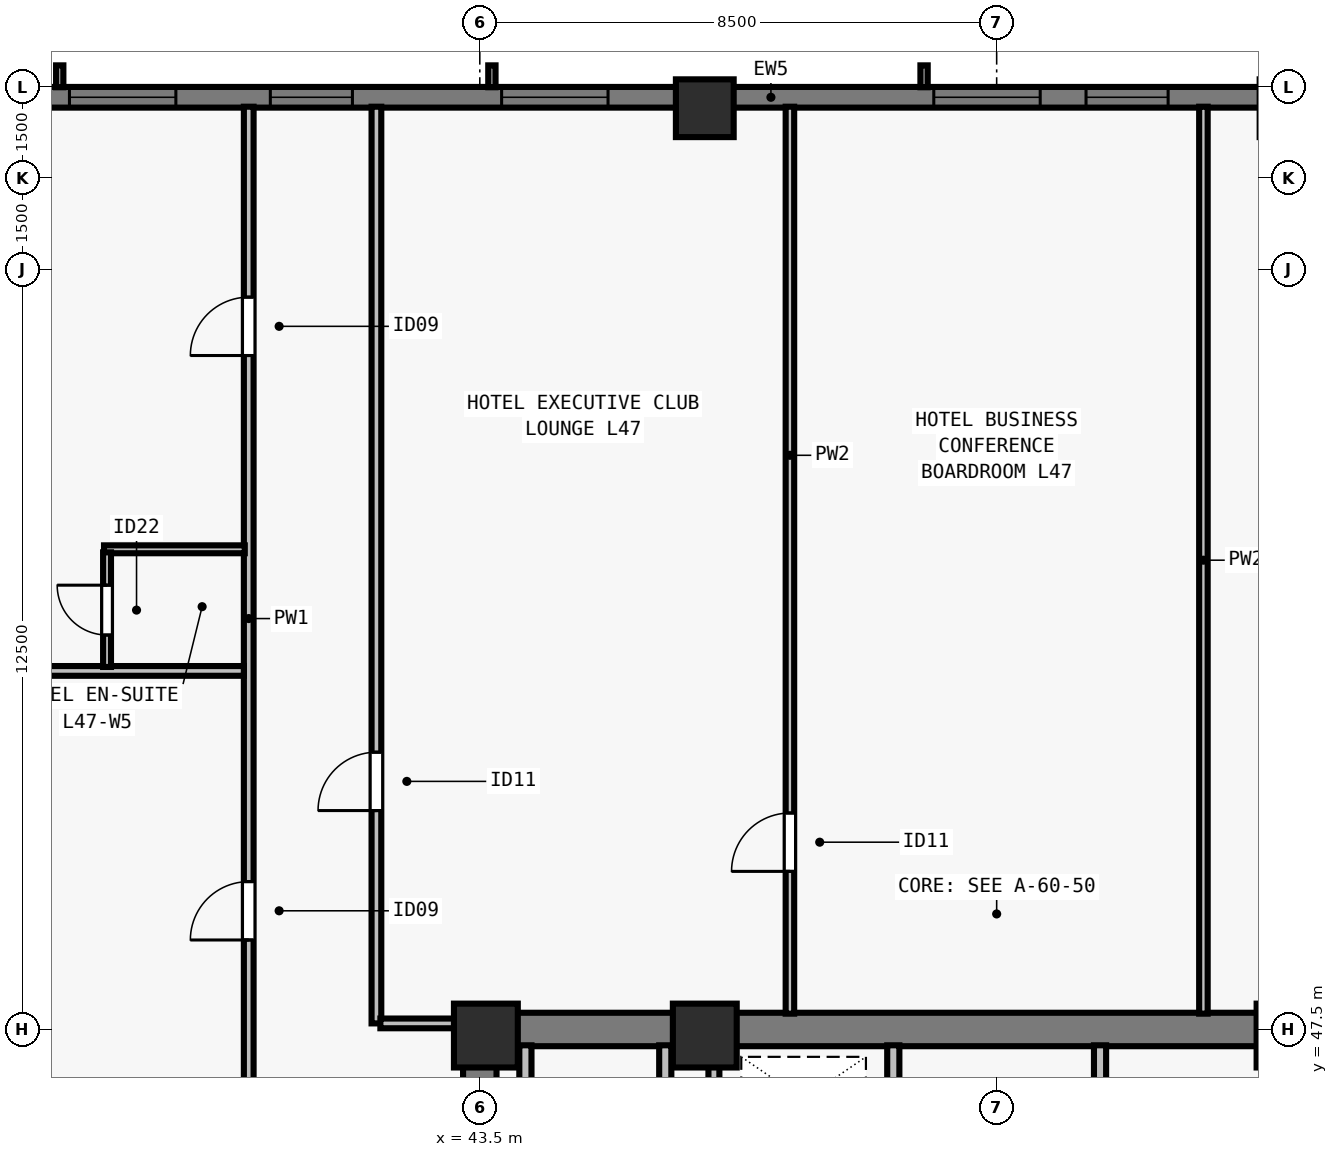
"""IFC4 building model, lengths in metres.
Left out: names, types, materials, properties, quantities, classifications, styles, units other than length and angle.
Written with IfcOpenShell. Run it as: python <this file> out.ifc"""

import sys

from ifc_helpers import new_model, si_unit, direction, frame, frame_2d, origin, origin_2d, place, context, subcontext, project, spatial, rectangle, extrude, element, fill, save


model = new_model("IFC4")
c1 = context("Model", 3, precision=1e-05, world=origin(), true_north=direction((0.0, 1.0)))
c2 = subcontext(c1, "Body", "Model", "MODEL_VIEW")
j1 = project(units=[si_unit("LENGTHUNIT", "METRE"), si_unit("PLANEANGLEUNIT", "RADIAN")], contexts=[c1])
p1 = place(None, origin())
s1 = spatial("IfcSite", under=j1, at=p1, CompositionType="ELEMENT")
p2 = place(p1, origin())
s2 = spatial("IfcBuilding", under=s1, at=p2, CompositionType="ELEMENT")
p3 = place(p2, frame((0.0, 0.0, 172.5)))
s3 = spatial("IfcBuildingStorey", under=s2, at=p3, CompositionType="ELEMENT", Elevation=172.5)
for number, where, z_axis, x_axis in (
    (1, (43.6, 47.4, 0.0), (0.0, 0.0, 1.0), (1.0, 0.0, 0.0)),
    (2, (47.2, 47.4, 0.0), (0.0, 0.0, 1.0), (1.0, 0.0, 0.0)),
    (3, (56.8, 47.4, 0.0), (0.0, 0.0, 1.0), (1.0, 0.0, 0.0)),
):
    element("IfcColumn", number, at=place(p3, frame(where, z_axis=z_axis, x_axis=x_axis)), inside=s3, PredefinedType="COLUMN", context=c2, shape_type="SweptSolid", body=[
        extrude(rectangle(XDim=1.05, YDim=1.05, at=origin_2d()), origin(), (0.0, 0.0, 1.0), 3.5),
    ])
p4 = place(p3, frame((47.2, 62.65, 0.0), z_axis=(0.0, 0.0, 1.0), x_axis=(1.0, 0.0, 0.0)))
e4 = element("IfcColumn", 4, at=p4, inside=s3, PredefinedType="COLUMN", context=c2, shape_type="SweptSolid", body=[
    extrude(rectangle(XDim=0.95, YDim=0.95, at=origin_2d()), origin(), (0.0, 0.0, 1.0), 3.5),
])
p5 = place(p3, frame((32.0, 62.83, 0.0), z_axis=(0.0, 0.0, 1.0), x_axis=(1.0, 0.0, 0.0)))
e5 = element("IfcWall", 5, at=p5, inside=s3, PredefinedType="SOLIDWALL", context=c2, shape_type="SweptSolid", body=[
    extrude(rectangle(XDim=39.682, YDim=0.34, at=frame_2d((19.841, 0.0))), origin(), (0.0, 0.0, 1.0), 3.28),
])
p6 = place(p5, frame((4.752, 0.0, 0.8)))
e6 = element("IfcOpeningElement", 6, at=p6, cuts=e5, PredefinedType="OPENING", context=c2, shape_type="SweptSolid", body=[
    extrude(rectangle(XDim=1.75, YDim=1.66, at=frame_2d((0.875, 0.83))), frame((0.0, 0.18, 0.0), z_axis=(0.0, -1.0, 0.0), x_axis=(1.0, 0.0, 0.0)), (0.0, 0.0, 1.0), 0.36),
])
p7 = place(p5, frame((8.055, 0.0, 0.8)))
e7 = element("IfcOpeningElement", 7, at=p7, cuts=e5, PredefinedType="OPENING", context=c2, shape_type="SweptSolid", body=[
    extrude(rectangle(XDim=1.35, YDim=1.66, at=frame_2d((0.675, 0.83))), frame((0.0, 0.18, 0.0), z_axis=(0.0, -1.0, 0.0), x_axis=(1.0, 0.0, 0.0)), (0.0, 0.0, 1.0), 0.36),
])
p8 = place(p5, frame((11.859, 0.0, 0.8)))
e8 = element("IfcOpeningElement", 8, at=p8, cuts=e5, PredefinedType="OPENING", context=c2, shape_type="SweptSolid", body=[
    extrude(rectangle(XDim=1.75, YDim=1.66, at=frame_2d((0.875, 0.83))), frame((0.0, 0.18, 0.0), z_axis=(0.0, -1.0, 0.0), x_axis=(1.0, 0.0, 0.0)), (0.0, 0.0, 1.0), 0.36),
])
p9 = place(p5, frame((18.966, 0.0, 0.8)))
e9 = element("IfcOpeningElement", 9, at=p9, cuts=e5, PredefinedType="OPENING", context=c2, shape_type="SweptSolid", body=[
    extrude(rectangle(XDim=1.75, YDim=1.66, at=frame_2d((0.875, 0.83))), frame((0.0, 0.18, 0.0), z_axis=(0.0, -1.0, 0.0), x_axis=(1.0, 0.0, 0.0)), (0.0, 0.0, 1.0), 0.36),
])
p10 = place(p5, frame((21.469, 0.0, 0.8)))
e10 = element("IfcOpeningElement", 10, at=p10, cuts=e5, PredefinedType="OPENING", context=c2, shape_type="SweptSolid", body=[
    extrude(rectangle(XDim=1.35, YDim=1.66, at=frame_2d((0.675, 0.83))), frame((0.0, 0.18, 0.0), z_axis=(0.0, -1.0, 0.0), x_axis=(1.0, 0.0, 0.0)), (0.0, 0.0, 1.0), 0.36),
])
p11 = place(p5, frame((26.073, 0.0, 0.8)))
e11 = element("IfcOpeningElement", 11, at=p11, cuts=e5, PredefinedType="OPENING", context=c2, shape_type="SweptSolid", body=[
    extrude(rectangle(XDim=1.75, YDim=1.66, at=frame_2d((0.875, 0.83))), frame((0.0, 0.18, 0.0), z_axis=(0.0, -1.0, 0.0), x_axis=(1.0, 0.0, 0.0)), (0.0, 0.0, 1.0), 0.36),
])
p12 = place(p5, frame((29.827, 0.0, 0.8)))
e12 = element("IfcOpeningElement", 12, at=p12, cuts=e5, PredefinedType="OPENING", context=c2, shape_type="SweptSolid", body=[
    extrude(rectangle(XDim=1.35, YDim=1.66, at=frame_2d((0.675, 0.83))), frame((0.0, 0.18, 0.0), z_axis=(0.0, -1.0, 0.0), x_axis=(1.0, 0.0, 0.0)), (0.0, 0.0, 1.0), 0.36),
])
p13 = place(p5, frame((34.47, 0.0, 0.8)))
e13 = element("IfcOpeningElement", 13, at=p13, cuts=e5, PredefinedType="OPENING", context=c2, shape_type="SweptSolid", body=[
    extrude(rectangle(XDim=0.9, YDim=1.66, at=frame_2d((0.45, 0.83))), frame((0.0, 0.18, 0.0), z_axis=(0.0, -1.0, 0.0), x_axis=(1.0, 0.0, 0.0)), (0.0, 0.0, 1.0), 0.36),
])
p14 = place(p3, frame((43.225, 47.5, 0.0), z_axis=(0.0, 0.0, 1.0), x_axis=(1.0, 0.0, 0.0)))
e14 = element("IfcWall", 14, at=p14, inside=s3, PredefinedType="SHEAR", context=c2, shape_type="SweptSolid", body=[
    extrude(rectangle(XDim=17.55, YDim=0.55, at=frame_2d((8.775, 0.0))), origin(), (0.0, 0.0, 1.0), 3.28),
])
p15 = place(p3, frame((43.5, 40.8, 0.0), z_axis=(0.0, 0.0, 1.0), x_axis=(0.0, 1.0, 0.0)))
e15 = element("IfcWall", 15, at=p15, inside=s3, PredefinedType="SHEAR", context=c2, shape_type="SweptSolid", body=[
    extrude(rectangle(XDim=6.435, YDim=0.55, at=frame_2d((3.218, 0.0))), origin(), (0.0, 0.0, 1.0), 3.28),
])
p16 = place(p3, frame((50.3, 40.585, 0.0), z_axis=(0.0, 0.0, 1.0), x_axis=(0.0, 1.0, 0.0)))
e16 = element("IfcWall", 16, at=p16, inside=s3, PredefinedType="SOLIDWALL", context=c2, shape_type="SweptSolid", body=[
    extrude(rectangle(XDim=6.655, YDim=0.2, at=frame_2d((3.328, 0.0))), origin(), (0.0, 0.0, 1.0), 3.28),
])
p17 = place(p16, frame((5.065, 0.0, 0.0)))
e17 = element("IfcOpeningElement", 17, at=p17, cuts=e16, PredefinedType="OPENING", context=c2, shape_type="SweptSolid", body=[
    extrude(rectangle(XDim=0.8, YDim=2.08, at=frame_2d((0.4, 1.04))), frame((0.0, 0.11, 0.0), z_axis=(0.0, -1.0, 0.0), x_axis=(1.0, 0.0, 0.0)), (0.0, 0.0, 1.0), 0.22),
])
p18 = place(p3, frame((53.7, 40.585, 0.0), z_axis=(0.0, 0.0, 1.0), x_axis=(0.0, 1.0, 0.0)))
e18 = element("IfcWall", 18, at=p18, inside=s3, PredefinedType="SOLIDWALL", context=c2, shape_type="SweptSolid", body=[
    extrude(rectangle(XDim=6.655, YDim=0.2, at=frame_2d((3.328, 0.0))), origin(), (0.0, 0.0, 1.0), 3.28),
])
p19 = place(p18, frame((0.195, 0.0, 0.0)))
e19 = element("IfcOpeningElement", 19, at=p19, cuts=e18, PredefinedType="OPENING", context=c2, shape_type="SweptSolid", body=[
    extrude(rectangle(XDim=0.8, YDim=2.08, at=frame_2d((0.4, 1.04))), frame((0.0, 0.11, 0.0), z_axis=(0.0, -1.0, 0.0), x_axis=(1.0, 0.0, 0.0)), (0.0, 0.0, 1.0), 0.22),
])
p20 = place(p18, frame((4.265, 0.0, 0.0)))
e20 = element("IfcOpeningElement", 20, at=p20, cuts=e18, PredefinedType="OPENING", context=c2, shape_type="SweptSolid", body=[
    extrude(rectangle(XDim=0.95, YDim=2.12, at=frame_2d((0.475, 1.06))), frame((0.0, 0.11, 0.0), z_axis=(0.0, -1.0, 0.0), x_axis=(1.0, 0.0, 0.0)), (0.0, 0.0, 1.0), 0.22),
])
for number, where, z_axis, x_axis in (
    (21, (46.55, 43.735, 0.0), (0.0, 0.0, 1.0), (0.0, 1.0, 0.0)),
    (22, (44.25, 43.735, 0.0), (0.0, 0.0, 1.0), (0.0, 1.0, 0.0)),
):
    element("IfcWall", number, at=place(p3, frame(where, z_axis=z_axis, x_axis=x_axis)), inside=s3, PredefinedType="SOLIDWALL", context=c2, shape_type="SweptSolid", body=[
        extrude(rectangle(XDim=3.505, YDim=0.2, at=frame_2d((1.752, 0.0))), origin(), (0.0, 0.0, 1.0), 3.28),
    ])
p21 = place(p3, frame((47.35, 43.735, 0.0), z_axis=(0.0, 0.0, 1.0), x_axis=(0.0, 1.0, 0.0)))
e23 = element("IfcWall", 23, at=p21, inside=s3, PredefinedType="SOLIDWALL", context=c2, shape_type="SweptSolid", body=[
    extrude(rectangle(XDim=3.505, YDim=0.18, at=frame_2d((1.752, 0.0))), origin(), (0.0, 0.0, 1.0), 3.28),
])
p22 = place(p3, frame((39.7, 15.325, 0.0), z_axis=(0.0, 0.0, 1.0), x_axis=(0.0, 1.0, 0.0)))
e24 = element("IfcWall", 24, at=p22, inside=s3, PredefinedType="PARTITIONING", context=c2, shape_type="SweptSolid", body=[
    extrude(rectangle(XDim=47.35, YDim=0.16, at=frame_2d((23.675, 0.0))), origin(), (0.0, 0.0, 1.0), 2.555),
])
p23 = place(p22, frame((5.451, 0.0, 0.0)))
e25 = element("IfcOpeningElement", 25, at=p23, cuts=e24, PredefinedType="OPENING", context=c2, shape_type="SweptSolid", body=[
    extrude(rectangle(XDim=0.96, YDim=2.15, at=frame_2d((0.48, 1.075))), frame((0.0, 0.09, 0.0), z_axis=(0.0, -1.0, 0.0), x_axis=(1.0, 0.0, 0.0)), (0.0, 0.0, 1.0), 0.18),
])
p24 = place(p22, frame((14.783, 0.0, 0.0)))
e26 = element("IfcOpeningElement", 26, at=p24, cuts=e24, PredefinedType="OPENING", context=c2, shape_type="SweptSolid", body=[
    extrude(rectangle(XDim=0.96, YDim=2.15, at=frame_2d((0.48, 1.075))), frame((0.0, 0.09, 0.0), z_axis=(0.0, -1.0, 0.0), x_axis=(1.0, 0.0, 0.0)), (0.0, 0.0, 1.0), 0.18),
])
p25 = place(p22, frame((24.215, 0.0, 0.0)))
e27 = element("IfcOpeningElement", 27, at=p25, cuts=e24, PredefinedType="OPENING", context=c2, shape_type="SweptSolid", body=[
    extrude(rectangle(XDim=0.96, YDim=2.15, at=frame_2d((0.48, 1.075))), frame((0.0, 0.09, 0.0), z_axis=(0.0, -1.0, 0.0), x_axis=(1.0, 0.0, 0.0)), (0.0, 0.0, 1.0), 0.18),
])
p26 = place(p22, frame((33.647, 0.0, 0.0)))
e28 = element("IfcOpeningElement", 28, at=p26, cuts=e24, PredefinedType="OPENING", context=c2, shape_type="SweptSolid", body=[
    extrude(rectangle(XDim=0.96, YDim=2.15, at=frame_2d((0.48, 1.075))), frame((0.0, 0.09, 0.0), z_axis=(0.0, -1.0, 0.0), x_axis=(1.0, 0.0, 0.0)), (0.0, 0.0, 1.0), 0.18),
])
p27 = place(p22, frame((43.258, 0.0, 0.0)))
e29 = element("IfcOpeningElement", 29, at=p27, cuts=e24, PredefinedType="OPENING", context=c2, shape_type="SweptSolid", body=[
    extrude(rectangle(XDim=0.96, YDim=2.15, at=frame_2d((0.48, 1.075))), frame((0.0, 0.09, 0.0), z_axis=(0.0, -1.0, 0.0), x_axis=(1.0, 0.0, 0.0)), (0.0, 0.0, 1.0), 0.18),
])
p28 = place(p3, frame((41.8, 47.6, 0.0), z_axis=(0.0, 0.0, 1.0), x_axis=(0.0, 1.0, 0.0)))
e30 = element("IfcWall", 30, at=p28, inside=s3, PredefinedType="PARTITIONING", context=c2, shape_type="SweptSolid", body=[
    extrude(rectangle(XDim=15.075, YDim=0.16, at=frame_2d((7.538, 0.0))), origin(), (0.0, 0.0, 1.0), 2.555),
])
p29 = place(p28, frame((3.5, 0.0, 0.0)))
e31 = element("IfcOpeningElement", 31, at=p29, cuts=e30, PredefinedType="OPENING", context=c2, shape_type="SweptSolid", body=[
    extrude(rectangle(XDim=0.96, YDim=2.12, at=frame_2d((0.48, 1.06))), frame((0.0, 0.09, 0.0), z_axis=(0.0, -1.0, 0.0), x_axis=(1.0, 0.0, 0.0)), (0.0, 0.0, 1.0), 0.18),
])
p30 = place(p3, frame((41.865, 47.6, 0.0), z_axis=(0.0, 0.0, 1.0), x_axis=(1.0, 0.0, 0.0)))
e32 = element("IfcWall", 32, at=p30, inside=s3, PredefinedType="PARTITIONING", context=c2, shape_type="SweptSolid", body=[
    extrude(rectangle(XDim=1.37, YDim=0.16, at=frame_2d((0.685, 0.0))), origin(), (0.0, 0.0, 1.0), 3.28),
])
p31 = place(p3, frame((48.6, 47.76, 0.0), z_axis=(0.0, 0.0, 1.0), x_axis=(0.0, 1.0, 0.0)))
e33 = element("IfcWall", 33, at=p31, inside=s3, PredefinedType="PARTITIONING", context=c2, shape_type="SweptSolid", body=[
    extrude(rectangle(XDim=14.915, YDim=0.14, at=frame_2d((7.458, 0.0))), origin(), (0.0, 0.0, 1.0), 2.896),
])
p32 = place(p31, frame((2.34, 0.0, 0.0)))
e34 = element("IfcOpeningElement", 34, at=p32, cuts=e33, PredefinedType="OPENING", context=c2, shape_type="SweptSolid", body=[
    extrude(rectangle(XDim=0.96, YDim=2.12, at=frame_2d((0.48, 1.06))), frame((0.0, 0.08, 0.0), z_axis=(0.0, -1.0, 0.0), x_axis=(1.0, 0.0, 0.0)), (0.0, 0.0, 1.0), 0.16),
])
p33 = place(p3, frame((55.4, 47.76, 0.0), z_axis=(0.0, 0.0, 1.0), x_axis=(0.0, 1.0, 0.0)))
e35 = element("IfcWall", 35, at=p33, inside=s3, PredefinedType="PARTITIONING", context=c2, shape_type="SweptSolid", body=[
    extrude(rectangle(XDim=14.915, YDim=0.14, at=frame_2d((7.458, 0.0))), origin(), (0.0, 0.0, 1.0), 2.896),
])
p34 = place(p3, frame((28.325, 53.396, 0.0), z_axis=(0.0, 0.0, 1.0), x_axis=(1.0, 0.0, 0.0)))
e36 = element("IfcWall", 36, at=p34, inside=s3, PredefinedType="PARTITIONING", context=c2, shape_type="SweptSolid", body=[
    extrude(rectangle(XDim=11.295, YDim=0.16, at=frame_2d((5.647, 0.0))), origin(), (0.0, 0.0, 1.0), 2.896),
])
p35 = place(p3, frame((37.32, 55.396, 0.0), z_axis=(0.0, 0.0, 1.0), x_axis=(1.0, 0.0, 0.0)))
e37 = element("IfcWall", 37, at=p35, inside=s3, PredefinedType="PLUMBINGWALL", context=c2, shape_type="SweptSolid", body=[
    extrude(rectangle(XDim=2.315, YDim=0.13, at=frame_2d((1.157, 0.0))), origin(), (0.0, 0.0, 1.0), 3.28),
])
p36 = place(p3, frame((37.37, 53.462, 0.0), z_axis=(0.0, 0.0, 1.0), x_axis=(0.0, 1.0, 0.0)))
e38 = element("IfcWall", 38, at=p36, inside=s3, PredefinedType="PLUMBINGWALL", context=c2, shape_type="SweptSolid", body=[
    extrude(rectangle(XDim=1.885, YDim=0.13, at=frame_2d((0.942, 0.0))), origin(), (0.0, 0.0, 1.0), 3.28),
])
p37 = place(p36, frame((0.525, 0.0, 0.0)))
e39 = element("IfcOpeningElement", 39, at=p37, cuts=e38, PredefinedType="OPENING", context=c2, shape_type="SweptSolid", body=[
    extrude(rectangle(XDim=0.82, YDim=2.1, at=frame_2d((0.41, 1.05))), frame((0.0, 0.075, 0.0), z_axis=(0.0, -1.0, 0.0), x_axis=(1.0, 0.0, 0.0)), (0.0, 0.0, 1.0), 0.15),
])
p38 = place(p6, origin())
e40 = element("IfcWindow", 40, at=p38, inside=s3, PartitioningType="SINGLE_PANEL", PredefinedType="WINDOW", context=c2, shape_type="SweptSolid", body=[
    extrude(rectangle(XDim=1.75, YDim=1.66, at=frame_2d((0.875, 0.83))), frame((0.0, -0.05, 0.0), z_axis=(0.0, -1.0, 0.0), x_axis=(1.0, 0.0, 0.0)), (0.0, 0.0, 1.0), 0.06),
])
fill(e6, e40)
p39 = place(p7, origin())
e41 = element("IfcWindow", 41, at=p39, inside=s3, PartitioningType="SINGLE_PANEL", PredefinedType="WINDOW", context=c2, shape_type="SweptSolid", body=[
    extrude(rectangle(XDim=1.35, YDim=1.66, at=frame_2d((0.675, 0.83))), frame((0.0, -0.05, 0.0), z_axis=(0.0, -1.0, 0.0), x_axis=(1.0, 0.0, 0.0)), (0.0, 0.0, 1.0), 0.06),
])
fill(e7, e41)
p40 = place(p8, origin())
e42 = element("IfcWindow", 42, at=p40, inside=s3, PartitioningType="SINGLE_PANEL", PredefinedType="WINDOW", context=c2, shape_type="SweptSolid", body=[
    extrude(rectangle(XDim=1.75, YDim=1.66, at=frame_2d((0.875, 0.83))), frame((0.0, -0.05, 0.0), z_axis=(0.0, -1.0, 0.0), x_axis=(1.0, 0.0, 0.0)), (0.0, 0.0, 1.0), 0.06),
])
fill(e8, e42)
p41 = place(p9, origin())
e43 = element("IfcWindow", 43, at=p41, inside=s3, PartitioningType="SINGLE_PANEL", PredefinedType="WINDOW", context=c2, shape_type="SweptSolid", body=[
    extrude(rectangle(XDim=1.75, YDim=1.66, at=frame_2d((0.875, 0.83))), frame((0.0, -0.05, 0.0), z_axis=(0.0, -1.0, 0.0), x_axis=(1.0, 0.0, 0.0)), (0.0, 0.0, 1.0), 0.06),
])
fill(e9, e43)
p42 = place(p10, origin())
e44 = element("IfcWindow", 44, at=p42, inside=s3, PartitioningType="SINGLE_PANEL", PredefinedType="WINDOW", context=c2, shape_type="SweptSolid", body=[
    extrude(rectangle(XDim=1.35, YDim=1.66, at=frame_2d((0.675, 0.83))), frame((0.0, -0.05, 0.0), z_axis=(0.0, -1.0, 0.0), x_axis=(1.0, 0.0, 0.0)), (0.0, 0.0, 1.0), 0.06),
])
fill(e10, e44)
p43 = place(p29, origin())
e45 = element("IfcDoor", 45, at=p43, inside=s3, OperationType="SINGLE_SWING_LEFT", PredefinedType="DOOR", context=c2, shape_type="SweptSolid", body=[
    extrude(rectangle(XDim=0.96, YDim=2.12, at=frame_2d((0.48, 1.06))), frame((0.0, 0.025, 0.0), z_axis=(0.0, -1.0, 0.0), x_axis=(1.0, 0.0, 0.0)), (0.0, 0.0, 1.0), 0.05),
])
fill(e31, e45)
p44 = place(p32, origin())
e46 = element("IfcDoor", 46, at=p44, inside=s3, OperationType="SINGLE_SWING_LEFT", PredefinedType="DOOR", context=c2, shape_type="SweptSolid", body=[
    extrude(rectangle(XDim=0.96, YDim=2.12, at=frame_2d((0.48, 1.06))), frame((0.0, 0.025, 0.0), z_axis=(0.0, -1.0, 0.0), x_axis=(1.0, 0.0, 0.0)), (0.0, 0.0, 1.0), 0.05),
])
fill(e34, e46)
p45 = place(p26, origin())
e47 = element("IfcDoor", 47, at=p45, inside=s3, OperationType="SINGLE_SWING_LEFT", PredefinedType="DOOR", context=c2, shape_type="SweptSolid", body=[
    extrude(rectangle(XDim=0.96, YDim=2.15, at=frame_2d((0.48, 1.075))), frame((0.0, 0.025, 0.0), z_axis=(0.0, -1.0, 0.0), x_axis=(1.0, 0.0, 0.0)), (0.0, 0.0, 1.0), 0.05),
])
fill(e28, e47)
p46 = place(p37, origin())
e48 = element("IfcDoor", 48, at=p46, inside=s3, OperationType="SINGLE_SWING_RIGHT", PredefinedType="DOOR", context=c2, shape_type="SweptSolid", body=[
    extrude(rectangle(XDim=0.82, YDim=2.1, at=frame_2d((0.41, 1.05))), frame((0.0, 0.025, 0.0), z_axis=(0.0, -1.0, 0.0), x_axis=(1.0, 0.0, 0.0)), (0.0, 0.0, 1.0), 0.05),
])
fill(e39, e48)
p47 = place(p27, origin())
e49 = element("IfcDoor", 49, at=p47, inside=s3, OperationType="SINGLE_SWING_LEFT", PredefinedType="DOOR", context=c2, shape_type="SweptSolid", body=[
    extrude(rectangle(XDim=0.96, YDim=2.15, at=frame_2d((0.48, 1.075))), frame((0.0, 0.025, 0.0), z_axis=(0.0, -1.0, 0.0), x_axis=(1.0, 0.0, 0.0)), (0.0, 0.0, 1.0), 0.05),
])
fill(e29, e49)
save(model, sys.argv[1])
